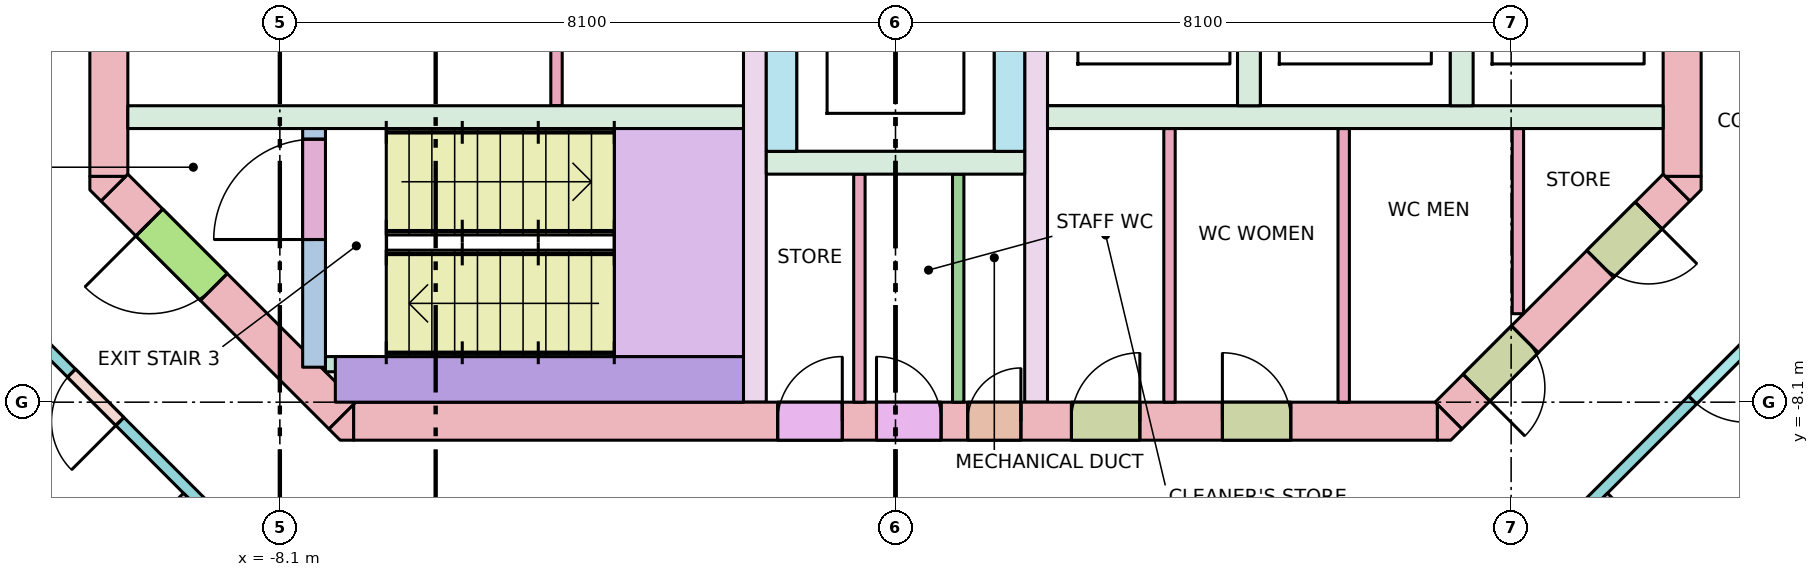
"""IFC4 building model, lengths in metres.
Left out: names, types, materials, properties, quantities, classifications, styles, units other than length and angle.
Written with IfcOpenShell. Run it as: python <this file> out.ifc"""

import sys

from ifc_helpers import new_model, si_unit, direction, frame, frame_2d, origin, place, context, subcontext, project, spatial, polyline, rectangle, outline, extrude, element, fill, save


model = new_model("IFC4")
c1 = context("Model", 3, precision=1e-05, world=origin(), true_north=direction((0.0, 1.0)))
c2 = subcontext(c1, "Body", "Model", "MODEL_VIEW")
j1 = project(units=[si_unit("LENGTHUNIT", "METRE"), si_unit("PLANEANGLEUNIT", "RADIAN")], contexts=[c1])
p1 = place(None, origin())
s1 = spatial("IfcSite", under=j1, at=p1, CompositionType="ELEMENT")
p2 = place(p1, origin())
s2 = spatial("IfcBuilding", under=s1, at=p2, CompositionType="ELEMENT")
p3 = place(p2, frame((0.0, 0.0, 264.9)))
s3 = spatial("IfcBuildingStorey", under=s2, at=p3, CompositionType="ELEMENT", Elevation=264.9)
p4 = place(p3, frame((-7.13, -8.35, -0.28), z_axis=(0.0, 0.0, 1.0), x_axis=(1.0, 0.0, 0.0)))
e1 = element("IfcWall", 1, at=p4, inside=s3, PredefinedType="SHEAR", context=c2, shape_type="SweptSolid", body=[
    extrude(rectangle(XDim=14.26, YDim=0.5, at=frame_2d((7.13, 0.0))), origin(), (0.0, 0.0, 1.0), 3.7),
])
p5 = place(p4, frame((8.08, 0.0, 0.28)))
e2 = element("IfcOpeningElement", 2, at=p5, cuts=e1, PredefinedType="OPENING", context=c2, shape_type="SweptSolid", body=[
    extrude(rectangle(XDim=0.7, YDim=2.1, at=frame_2d((0.35, 1.05))), frame((0.0, 0.26, 0.0), z_axis=(0.0, -1.0, 0.0), x_axis=(1.0, 0.0, 0.0)), (0.0, 0.0, 1.0), 0.52),
])
p6 = place(p4, frame((5.58, 0.0, 0.28)))
e3 = element("IfcOpeningElement", 3, at=p6, cuts=e1, PredefinedType="OPENING", context=c2, shape_type="SweptSolid", body=[
    extrude(rectangle(XDim=0.85, YDim=2.1, at=frame_2d((0.425, 1.05))), frame((0.0, 0.26, 0.0), z_axis=(0.0, -1.0, 0.0), x_axis=(1.0, 0.0, 0.0)), (0.0, 0.0, 1.0), 0.52),
])
p7 = place(p4, frame((6.88, 0.0, 0.28)))
e4 = element("IfcOpeningElement", 4, at=p7, cuts=e1, PredefinedType="OPENING", context=c2, shape_type="SweptSolid", body=[
    extrude(rectangle(XDim=0.85, YDim=2.1, at=frame_2d((0.425, 1.05))), frame((0.0, 0.26, 0.0), z_axis=(0.0, -1.0, 0.0), x_axis=(1.0, 0.0, 0.0)), (0.0, 0.0, 1.0), 0.52),
])
p8 = place(p4, frame((9.445, 0.0, 0.28)))
e5 = element("IfcOpeningElement", 5, at=p8, cuts=e1, PredefinedType="OPENING", context=c2, shape_type="SweptSolid", body=[
    extrude(rectangle(XDim=0.9, YDim=2.1, at=frame_2d((0.45, 1.05))), frame((0.0, 0.26, 0.0), z_axis=(0.0, -1.0, 0.0), x_axis=(1.0, 0.0, 0.0)), (0.0, 0.0, 1.0), 0.52),
])
p9 = place(p4, frame((11.431, 0.0, 0.28)))
e6 = element("IfcOpeningElement", 6, at=p9, cuts=e1, PredefinedType="OPENING", context=c2, shape_type="SweptSolid", body=[
    extrude(rectangle(XDim=0.9, YDim=2.1, at=frame_2d((0.45, 1.05))), frame((0.0, 0.26, 0.0), z_axis=(0.0, -1.0, 0.0), x_axis=(1.0, 0.0, 0.0)), (0.0, 0.0, 1.0), 0.52),
])
p10 = place(p3, frame((-10.35, -5.13, -0.28), z_axis=(0.0, 0.0, 1.0), x_axis=(0.0, 1.0, 0.0)))
e7 = element("IfcWall", 7, at=p10, inside=s3, PredefinedType="SHEAR", context=c2, shape_type="SweptSolid", body=[
    extrude(rectangle(XDim=10.26, YDim=0.5, at=frame_2d((5.13, 0.0))), origin(), (0.0, 0.0, 1.0), 3.7),
])
p11 = place(p10, frame((4.13, 0.0, 0.28)))
e8 = element("IfcOpeningElement", 8, at=p11, cuts=e7, PredefinedType="OPENING", context=c2, shape_type="SweptSolid", body=[
    extrude(rectangle(XDim=2.0, YDim=2.1, at=frame_2d((1.0, 1.05))), frame((0.0, 0.26, 0.0), z_axis=(0.0, -1.0, 0.0), x_axis=(1.0, 0.0, 0.0)), (0.0, 0.0, 1.0), 0.52),
])
p12 = place(p3, frame((10.35, -5.13, -0.28), z_axis=(0.0, 0.0, 1.0), x_axis=(0.0, 1.0, 0.0)))
e9 = element("IfcWall", 9, at=p12, inside=s3, PredefinedType="SHEAR", context=c2, shape_type="SweptSolid", body=[
    extrude(rectangle(XDim=10.26, YDim=0.5, at=frame_2d((5.13, 0.0))), origin(), (0.0, 0.0, 1.0), 3.7),
])
p13 = place(p12, frame((4.13, 0.0, 0.28)))
e10 = element("IfcOpeningElement", 10, at=p13, cuts=e9, PredefinedType="OPENING", context=c2, shape_type="SweptSolid", body=[
    extrude(rectangle(XDim=2.0, YDim=2.1, at=frame_2d((1.0, 1.05))), frame((0.0, 0.26, 0.0), z_axis=(0.0, -1.0, 0.0), x_axis=(1.0, 0.0, 0.0)), (0.0, 0.0, 1.0), 0.52),
])
p14 = place(p3, frame((10.277, -5.277, -0.28), z_axis=(0.0, 0.0, 1.0), x_axis=(-0.707106781187, -0.707106781187, 0.0)))
e11 = element("IfcWall", 11, at=p14, inside=s3, PredefinedType="SHEAR", context=c2, shape_type="SweptSolid", body=[
    extrude(rectangle(XDim=4.243, YDim=0.5, at=frame_2d((2.121, 0.0))), origin(), (0.0, 0.0, 1.0), 3.7),
])
p15 = place(p14, frame((2.823, 0.0, 0.28)))
e12 = element("IfcOpeningElement", 12, at=p15, cuts=e11, PredefinedType="OPENING", context=c2, shape_type="SweptSolid", body=[
    extrude(rectangle(XDim=0.9, YDim=2.1, at=frame_2d((0.45, 1.05))), frame((0.0, 0.26, 0.0), z_axis=(0.0, -1.0, 0.0), x_axis=(1.0, 0.0, 0.0)), (0.0, 0.0, 1.0), 0.52),
])
p16 = place(p14, frame((0.52, 0.0, 0.28)))
e13 = element("IfcOpeningElement", 13, at=p16, cuts=e11, PredefinedType="OPENING", context=c2, shape_type="SweptSolid", body=[
    extrude(rectangle(XDim=0.9, YDim=2.1, at=frame_2d((0.45, 1.05))), frame((0.0, 0.26, 0.0), z_axis=(0.0, -1.0, 0.0), x_axis=(1.0, 0.0, 0.0)), (0.0, 0.0, 1.0), 0.52),
])
p17 = place(p3, frame((-7.277, -8.277, -0.28), z_axis=(0.0, 0.0, 1.0), x_axis=(-0.707106781187, 0.707106781187, 0.0)))
e14 = element("IfcWall", 14, at=p17, inside=s3, PredefinedType="SHEAR", context=c2, shape_type="SweptSolid", body=[
    extrude(rectangle(XDim=4.243, YDim=0.5, at=frame_2d((2.121, 0.0))), origin(), (0.0, 0.0, 1.0), 3.7),
])
p18 = place(p17, frame((2.393, 0.0, 0.28)))
e15 = element("IfcOpeningElement", 15, at=p18, cuts=e14, PredefinedType="OPENING", context=c2, shape_type="SweptSolid", body=[
    extrude(rectangle(XDim=1.2, YDim=2.1, at=frame_2d((0.6, 1.05))), frame((0.0, 0.26, 0.0), z_axis=(0.0, -1.0, 0.0), x_axis=(1.0, 0.0, 0.0)), (0.0, 0.0, 1.0), 0.52),
])
p19 = place(p3, frame((0.0, 0.0, -0.28)))
e16 = element("IfcWall", 16, at=p19, inside=s3, PredefinedType="SHEAR", context=c2, shape_type="SweptSolid", body=[
    extrude(outline(polyline([(-7.307, -8.6), (-7.454, -8.454), (-7.13, -8.13), (-7.13, -8.6), (-7.307, -8.6)])), origin(), (0.0, 0.0, 1.0), 3.7),
])
p20 = place(p3, frame((0.0, 0.0, -0.28)))
e17 = element("IfcWall", 17, at=p20, inside=s3, PredefinedType="SHEAR", context=c2, shape_type="SweptSolid", body=[
    extrude(outline(polyline([(7.307, -8.6), (7.13, -8.6), (7.13, -8.13), (7.454, -8.454), (7.307, -8.6)])), origin(), (0.0, 0.0, 1.0), 3.7),
])
p21 = place(p3, frame((0.0, 0.0, -0.28)))
e18 = element("IfcWall", 18, at=p21, inside=s3, PredefinedType="SHEAR", context=c2, shape_type="SweptSolid", body=[
    extrude(outline(polyline([(-10.6, -5.307), (-10.6, -5.13), (-10.13, -5.13), (-10.454, -5.454), (-10.6, -5.307)])), origin(), (0.0, 0.0, 1.0), 3.7),
])
p22 = place(p3, frame((0.0, 0.0, -0.28)))
e19 = element("IfcWall", 19, at=p22, inside=s3, PredefinedType="SHEAR", context=c2, shape_type="SweptSolid", body=[
    extrude(outline(polyline([(10.6, -5.307), (10.454, -5.454), (10.13, -5.13), (10.6, -5.13), (10.6, -5.307)])), origin(), (0.0, 0.0, 1.0), 3.7),
])
for number, where, z_axis, x_axis in (
    (20, (-10.1, -4.35, 0.0), (0.0, 0.0, 1.0), (1.0, 0.0, 0.0)),
    (21, (2.0, -4.35, 0.0), (0.0, 0.0, 1.0), (1.0, 0.0, 0.0)),
):
    element("IfcWall", number, at=place(p3, frame(where, z_axis=z_axis, x_axis=x_axis)), inside=s3, PredefinedType="SOLIDWALL", context=c2, shape_type="SweptSolid", body=[
        extrude(rectangle(XDim=8.1, YDim=0.3, at=frame_2d((4.05, 0.0))), origin(), (0.0, 0.0, 1.0), 3.42),
    ])
for number, where, z_axis, x_axis in (
    (22, (4.65, -4.2, 0.0), (0.0, 0.0, 1.0), (0.0, 1.0, 0.0)),
    (23, (7.45, -4.2, 0.0), (0.0, 0.0, 1.0), (0.0, 1.0, 0.0)),
):
    element("IfcWall", number, at=place(p3, frame(where, z_axis=z_axis, x_axis=x_axis)), inside=s3, PredefinedType="SOLIDWALL", context=c2, shape_type="SweptSolid", body=[
        extrude(rectangle(XDim=2.4, YDim=0.3, at=frame_2d((1.2, 0.0))), origin(), (0.0, 0.0, 1.0), 3.42),
    ])
for number, where, z_axis, x_axis in (
    (24, (-1.85, -8.1, 0.0), (0.0, 0.0, 1.0), (0.0, 1.0, 0.0)),
    (25, (1.85, -8.1, 0.0), (0.0, 0.0, 1.0), (0.0, 1.0, 0.0)),
):
    element("IfcWall", number, at=place(p3, frame(where, z_axis=z_axis, x_axis=x_axis)), inside=s3, PredefinedType="SHEAR", context=c2, shape_type="SweptSolid", body=[
        extrude(rectangle(XDim=6.6, YDim=0.3, at=frame_2d((3.3, 0.0))), origin(), (0.0, 0.0, 1.0), 3.42),
    ])
for number, where, z_axis, x_axis in (
    (26, (-1.5, -4.8, 0.0), (0.0, 0.0, 1.0), (0.0, 1.0, 0.0)),
    (27, (1.5, -4.8, 0.0), (0.0, 0.0, 1.0), (0.0, 1.0, 0.0)),
):
    element("IfcWall", number, at=place(p3, frame(where, z_axis=z_axis, x_axis=x_axis)), inside=s3, PredefinedType="SOLIDWALL", context=c2, shape_type="SweptSolid", body=[
        extrude(rectangle(XDim=3.0, YDim=0.4, at=frame_2d((1.5, 0.0))), origin(), (0.0, 0.0, 1.0), 3.42),
    ])
p23 = place(p3, frame((-1.7, -4.95, 0.0), z_axis=(0.0, 0.0, 1.0), x_axis=(1.0, 0.0, 0.0)))
e28 = element("IfcWall", 28, at=p23, inside=s3, PredefinedType="SOLIDWALL", context=c2, shape_type="SweptSolid", body=[
    extrude(rectangle(XDim=3.4, YDim=0.3, at=frame_2d((1.7, 0.0))), origin(), (0.0, 0.0, 1.0), 3.42),
])
p24 = place(p3, frame((-7.65, -7.64, 0.0), z_axis=(0.0, 0.0, 1.0), x_axis=(0.0, 1.0, 0.0)))
e29 = element("IfcWall", 29, at=p24, inside=s3, PredefinedType="SHEAR", context=c2, shape_type="SweptSolid", body=[
    extrude(rectangle(XDim=3.14, YDim=0.3, at=frame_2d((1.57, 0.0))), origin(), (0.0, 0.0, 1.0), 3.42),
])
p25 = place(p24, frame((1.68, 0.0, 0.0)))
e30 = element("IfcOpeningElement", 30, at=p25, cuts=e29, PredefinedType="OPENING", context=c2, shape_type="SweptSolid", body=[
    extrude(rectangle(XDim=1.32, YDim=2.1, at=frame_2d((0.66, 1.05))), frame((0.0, 0.16, 0.0), z_axis=(0.0, -1.0, 0.0), x_axis=(1.0, 0.0, 0.0)), (0.0, 0.0, 1.0), 0.32),
])
p26 = place(p3, frame((-7.5, -7.6, 0.0), z_axis=(0.0, 0.0, 1.0), x_axis=(1.0, 0.0, 0.0)))
e31 = element("IfcWall", 31, at=p26, inside=s3, PredefinedType="SHEAR", context=c2, shape_type="SweptSolid", body=[
    extrude(rectangle(XDim=0.6, YDim=0.2, at=frame_2d((0.3, 0.0))), origin(), (0.0, 0.0, 1.0), 3.42),
])
p27 = place(p3, frame((-7.37, -7.8, 0.0), z_axis=(0.0, 0.0, 1.0), x_axis=(1.0, 0.0, 0.0)))
e32 = element("IfcWall", 32, at=p27, inside=s3, PredefinedType="SHEAR", context=c2, shape_type="SweptSolid", body=[
    extrude(rectangle(XDim=5.37, YDim=0.6, at=frame_2d((2.685, 0.0))), origin(), (0.0, 0.0, 1.0), 3.42),
])
for number, where, z_axis, x_axis in (
    (33, (0.825, -8.1, 0.0), (0.0, 0.0, 1.0), (0.0, 1.0, 0.0)),
    (34, (-0.475, -8.1, 0.0), (0.0, 0.0, 1.0), (0.0, 1.0, 0.0)),
):
    element("IfcWall", number, at=place(p3, frame(where, z_axis=z_axis, x_axis=x_axis)), inside=s3, PredefinedType="PARTITIONING", context=c2, shape_type="SweptSolid", body=[
        extrude(rectangle(XDim=3.0, YDim=0.15, at=frame_2d((1.5, 0.0))), origin(), (0.0, 0.0, 1.0), 3.42),
    ])
for number, where, z_axis, x_axis in (
    (35, (3.605, -8.1, 0.0), (0.0, 0.0, 1.0), (0.0, 1.0, 0.0)),
    (36, (5.897, -8.1, 0.0), (0.0, 0.0, 1.0), (0.0, 1.0, 0.0)),
):
    element("IfcWall", number, at=place(p3, frame(where, z_axis=z_axis, x_axis=x_axis)), inside=s3, PredefinedType="PARTITIONING", context=c2, shape_type="SweptSolid", body=[
        extrude(rectangle(XDim=3.6, YDim=0.15, at=frame_2d((1.8, 0.0))), origin(), (0.0, 0.0, 1.0), 3.42),
    ])
p28 = place(p3, frame((8.189, -6.936, 0.0), z_axis=(0.0, 0.0, 1.0), x_axis=(0.0, 1.0, 0.0)))
e37 = element("IfcWall", 37, at=p28, inside=s3, PredefinedType="PARTITIONING", context=c2, shape_type="SweptSolid", body=[
    extrude(rectangle(XDim=2.436, YDim=0.15, at=frame_2d((1.218, 0.0))), origin(), (0.0, 0.0, 1.0), 3.42),
])
p29 = place(p3, frame((-4.46, -4.2, 0.0), z_axis=(0.0, 0.0, 1.0), x_axis=(0.0, 1.0, 0.0)))
e38 = element("IfcWall", 38, at=p29, inside=s3, PredefinedType="PARTITIONING", context=c2, shape_type="SweptSolid", body=[
    extrude(rectangle(XDim=2.55, YDim=0.15, at=frame_2d((1.275, 0.0))), origin(), (0.0, 0.0, 1.0), 3.42),
])
p30 = place(p3, frame((12.438, -6.121, 0.0), z_axis=(0.0, 0.0, 1.0), x_axis=(-0.707106781187, -0.707106781187, 0.0)))
e39 = element("IfcWall", 39, at=p30, inside=s3, PredefinedType="PARTITIONING", context=c2, shape_type="SweptSolid", body=[
    extrude(rectangle(XDim=6.105, YDim=0.15, at=frame_2d((3.053, 0.0))), origin(), (0.0, 0.0, 1.0), 2.57),
])
p31 = place(p30, frame((1.758, 0.0, 0.0)))
e40 = element("IfcOpeningElement", 40, at=p31, cuts=e39, PredefinedType="OPENING", context=c2, shape_type="SweptSolid", body=[
    extrude(rectangle(XDim=1.0, YDim=2.1, at=frame_2d((0.5, 1.05))), frame((0.0, 0.085, 0.0), z_axis=(0.0, -1.0, 0.0), x_axis=(1.0, 0.0, 0.0)), (0.0, 0.0, 1.0), 0.17),
])
p32 = place(p3, frame((-8.121, -10.438, 0.0), z_axis=(0.0, 0.0, 1.0), x_axis=(-0.707106781187, 0.707106781187, 0.0)))
e41 = element("IfcWall", 41, at=p32, inside=s3, PredefinedType="PARTITIONING", context=c2, shape_type="SweptSolid", body=[
    extrude(rectangle(XDim=6.105, YDim=0.15, at=frame_2d((3.053, 0.0))), origin(), (0.0, 0.0, 1.0), 2.57),
])
p33 = place(p32, frame((0.344, 0.0, 0.0)))
e42 = element("IfcOpeningElement", 42, at=p33, cuts=e41, PredefinedType="OPENING", context=c2, shape_type="SweptSolid", body=[
    extrude(rectangle(XDim=1.0, YDim=2.1, at=frame_2d((0.5, 1.05))), frame((0.0, 0.085, 0.0), z_axis=(0.0, -1.0, 0.0), x_axis=(1.0, 0.0, 0.0)), (0.0, 0.0, 1.0), 0.17),
])
p34 = place(p32, frame((2.948, 0.0, 0.0)))
e43 = element("IfcOpeningElement", 43, at=p34, cuts=e41, PredefinedType="OPENING", context=c2, shape_type="SweptSolid", body=[
    extrude(rectangle(XDim=0.9, YDim=2.1, at=frame_2d((0.45, 1.05))), frame((0.0, 0.085, 0.0), z_axis=(0.0, -1.0, 0.0), x_axis=(1.0, 0.0, 0.0)), (0.0, 0.0, 1.0), 0.17),
])
for number, where, z_axis, x_axis in (
    (44, (-9.333, -9.333, 0.0), (0.0, 0.0, 1.0), (-0.707, -0.707, 0.0)),
    (45, (9.333, -9.333, 0.0), (0.0, 0.0, 1.0), (0.707, -0.707, 0.0)),
):
    element("IfcWall", number, at=place(p3, frame(where, z_axis=z_axis, x_axis=x_axis)), inside=s3, PredefinedType="PARTITIONING", context=c2, shape_type="SweptSolid", body=[
        extrude(rectangle(XDim=7.639, YDim=0.1, at=frame_2d((3.819, 0.0))), origin(), (0.0, 0.0, 1.0), 2.57),
    ])
p35 = place(p25, origin())
e46 = element("IfcDoor", 46, at=p35, inside=s3, OperationType="DOUBLE_DOOR_SINGLE_SWING", PredefinedType="DOOR", context=c2, shape_type="SweptSolid", body=[
    extrude(rectangle(XDim=1.32, YDim=2.1, at=frame_2d((0.66, 1.05))), frame((0.0, 0.025, 0.0), z_axis=(0.0, -1.0, 0.0), x_axis=(1.0, 0.0, 0.0)), (0.0, 0.0, 1.0), 0.05),
])
fill(e30, e46)
p36 = place(p18, origin())
e47 = element("IfcDoor", 47, at=p36, inside=s3, OperationType="SINGLE_SWING_RIGHT", PredefinedType="DOOR", context=c2, shape_type="SweptSolid", body=[
    extrude(rectangle(XDim=1.2, YDim=2.1, at=frame_2d((0.6, 1.05))), frame((0.0, 0.025, 0.0), z_axis=(0.0, -1.0, 0.0), x_axis=(1.0, 0.0, 0.0)), (0.0, 0.0, 1.0), 0.05),
])
fill(e15, e47)
p37 = place(p5, origin())
e48 = element("IfcDoor", 48, at=p37, inside=s3, OperationType="SINGLE_SWING_RIGHT", PredefinedType="DOOR", context=c2, shape_type="SweptSolid", body=[
    extrude(rectangle(XDim=0.7, YDim=2.1, at=frame_2d((0.35, 1.05))), frame((0.0, 0.025, 0.0), z_axis=(0.0, -1.0, 0.0), x_axis=(1.0, 0.0, 0.0)), (0.0, 0.0, 1.0), 0.05),
])
fill(e2, e48)
p38 = place(p6, origin())
e49 = element("IfcDoor", 49, at=p38, inside=s3, OperationType="SINGLE_SWING_RIGHT", PredefinedType="DOOR", context=c2, shape_type="SweptSolid", body=[
    extrude(rectangle(XDim=0.85, YDim=2.1, at=frame_2d((0.425, 1.05))), frame((0.0, 0.025, 0.0), z_axis=(0.0, -1.0, 0.0), x_axis=(1.0, 0.0, 0.0)), (0.0, 0.0, 1.0), 0.05),
])
fill(e3, e49)
p39 = place(p7, origin())
e50 = element("IfcDoor", 50, at=p39, inside=s3, OperationType="SINGLE_SWING_LEFT", PredefinedType="DOOR", context=c2, shape_type="SweptSolid", body=[
    extrude(rectangle(XDim=0.85, YDim=2.1, at=frame_2d((0.425, 1.05))), frame((0.0, 0.025, 0.0), z_axis=(0.0, -1.0, 0.0), x_axis=(1.0, 0.0, 0.0)), (0.0, 0.0, 1.0), 0.05),
])
fill(e4, e50)
p40 = place(p8, origin())
e51 = element("IfcDoor", 51, at=p40, inside=s3, OperationType="SINGLE_SWING_RIGHT", PredefinedType="DOOR", context=c2, shape_type="SweptSolid", body=[
    extrude(rectangle(XDim=0.9, YDim=2.1, at=frame_2d((0.45, 1.05))), frame((0.0, 0.025, 0.0), z_axis=(0.0, -1.0, 0.0), x_axis=(1.0, 0.0, 0.0)), (0.0, 0.0, 1.0), 0.05),
])
fill(e5, e51)
p41 = place(p9, origin())
e52 = element("IfcDoor", 52, at=p41, inside=s3, OperationType="SINGLE_SWING_LEFT", PredefinedType="DOOR", context=c2, shape_type="SweptSolid", body=[
    extrude(rectangle(XDim=0.9, YDim=2.1, at=frame_2d((0.45, 1.05))), frame((0.0, 0.025, 0.0), z_axis=(0.0, -1.0, 0.0), x_axis=(1.0, 0.0, 0.0)), (0.0, 0.0, 1.0), 0.05),
])
fill(e6, e52)
p42 = place(p15, origin())
e53 = element("IfcDoor", 53, at=p42, inside=s3, OperationType="SINGLE_SWING_RIGHT", PredefinedType="DOOR", context=c2, shape_type="SweptSolid", body=[
    extrude(rectangle(XDim=0.9, YDim=2.1, at=frame_2d((0.45, 1.05))), frame((0.0, 0.025, 0.0), z_axis=(0.0, -1.0, 0.0), x_axis=(1.0, 0.0, 0.0)), (0.0, 0.0, 1.0), 0.05),
])
fill(e12, e53)
p43 = place(p16, origin())
e54 = element("IfcDoor", 54, at=p43, inside=s3, OperationType="SINGLE_SWING_LEFT", PredefinedType="DOOR", context=c2, shape_type="SweptSolid", body=[
    extrude(rectangle(XDim=0.9, YDim=2.1, at=frame_2d((0.45, 1.05))), frame((0.0, 0.025, 0.0), z_axis=(0.0, -1.0, 0.0), x_axis=(1.0, 0.0, 0.0)), (0.0, 0.0, 1.0), 0.05),
])
fill(e13, e54)
p44 = place(p31, origin())
e55 = element("IfcDoor", 55, at=p44, inside=s3, OperationType="SINGLE_SWING_LEFT", PredefinedType="DOOR", context=c2, shape_type="SweptSolid", body=[
    extrude(rectangle(XDim=1.0, YDim=2.1, at=frame_2d((0.5, 1.05))), frame((0.0, 0.025, 0.0), z_axis=(0.0, -1.0, 0.0), x_axis=(1.0, 0.0, 0.0)), (0.0, 0.0, 1.0), 0.05),
])
fill(e40, e55)
p45 = place(p34, origin())
e56 = element("IfcDoor", 56, at=p45, inside=s3, OperationType="SINGLE_SWING_LEFT", PredefinedType="DOOR", context=c2, shape_type="SweptSolid", body=[
    extrude(rectangle(XDim=0.9, YDim=2.1, at=frame_2d((0.45, 1.05))), frame((0.0, 0.025, 0.0), z_axis=(0.0, -1.0, 0.0), x_axis=(1.0, 0.0, 0.0)), (0.0, 0.0, 1.0), 0.05),
])
fill(e43, e56)
save(model, sys.argv[1])
